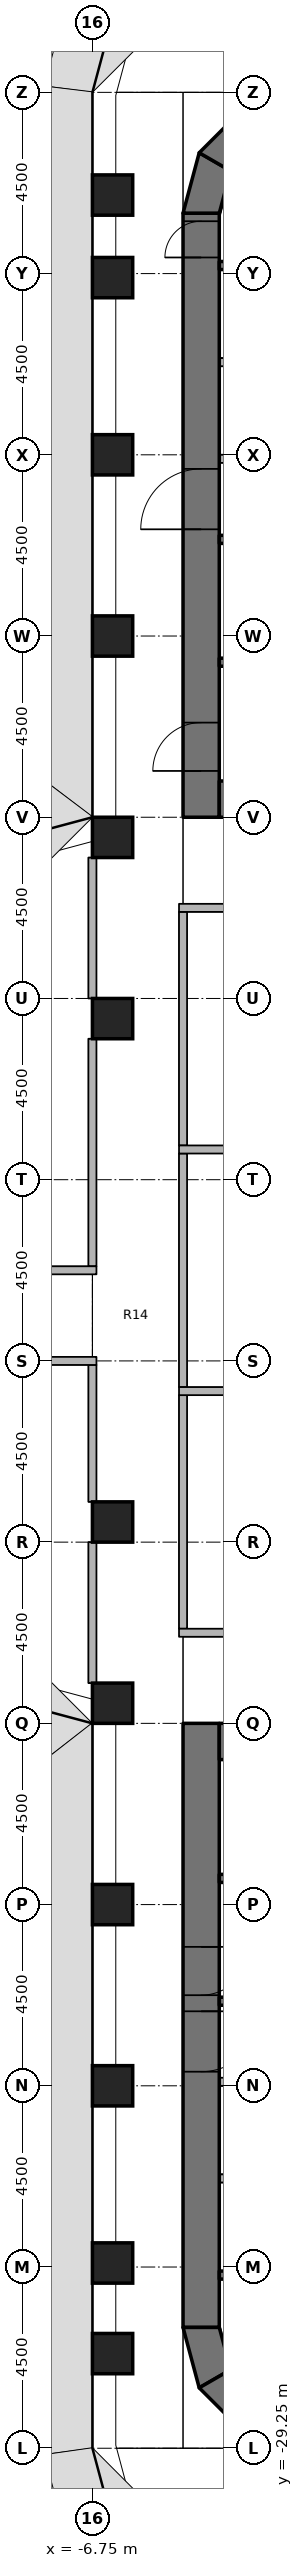
"""IFC4 building model, lengths in metres.
Left out: names, types, materials, properties, quantities, classifications, styles, units other than length and angle.
Written with IfcOpenShell. Run it as: python <this file> out.ifc"""

import sys

from ifc_helpers import new_model, si_unit, direction, frame, frame_2d, origin, origin_2d, place, context, subcontext, project, spatial, polyline, rectangle, outline, extrude, element, fill, save


model = new_model("IFC4")
c1 = context("Model", 3, precision=1e-05, world=origin(), true_north=direction((0.0, 1.0)))
c2 = subcontext(c1, "Body", "Model", "MODEL_VIEW")
j1 = project(units=[si_unit("LENGTHUNIT", "METRE"), si_unit("PLANEANGLEUNIT", "RADIAN")], contexts=[c1])
p1 = place(None, origin())
s1 = spatial("IfcSite", under=j1, at=p1, CompositionType="ELEMENT")
p2 = place(p1, origin())
s2 = spatial("IfcBuilding", under=s1, at=p2, CompositionType="ELEMENT")
p3 = place(p2, frame((0.0, 0.0, 31.2)))
s3 = spatial("IfcBuildingStorey", under=s2, at=p3, CompositionType="ELEMENT", Elevation=31.2)
for number, where, z_axis, x_axis in (
    (1, (-6.25, -26.9, 0.0), (0.0, 0.0, 1.0), (1.0, 0.0, 0.0)),
    (2, (-6.25, -24.65, 0.0), (0.0, 0.0, 1.0), (1.0, 0.0, 0.0)),
    (3, (-6.25, -20.25, 0.0), (0.0, 0.0, 1.0), (1.0, 0.0, 0.0)),
    (4, (-6.25, -15.75, 0.0), (0.0, 0.0, 1.0), (1.0, 0.0, 0.0)),
    (5, (-6.25, -10.75, 0.0), (0.0, 0.0, 1.0), (1.0, 0.0, 0.0)),
    (6, (-6.25, -6.25, 0.0), (0.0, 0.0, 1.0), (1.0, 0.0, 0.0)),
    (7, (-6.25, 6.25, 0.0), (0.0, 0.0, 1.0), (1.0, 0.0, 0.0)),
    (8, (-6.25, 10.75, 0.0), (0.0, 0.0, 1.0), (1.0, 0.0, 0.0)),
    (9, (-6.25, 15.75, 0.0), (0.0, 0.0, 1.0), (1.0, 0.0, 0.0)),
    (10, (-6.25, 20.25, 0.0), (0.0, 0.0, 1.0), (1.0, 0.0, 0.0)),
    (11, (-6.25, 24.65, 0.0), (0.0, 0.0, 1.0), (1.0, 0.0, 0.0)),
    (12, (-6.25, 26.7, 0.0), (0.0, 0.0, 1.0), (1.0, 0.0, 0.0)),
):
    element("IfcColumn", number, at=place(p3, frame(where, z_axis=z_axis, x_axis=x_axis)), inside=s3, PredefinedType="COLUMN", context=c2, shape_type="SweptSolid", body=[
        extrude(rectangle(XDim=1.0, YDim=1.0, at=origin_2d()), origin(), (0.0, 0.0, 1.0), 4.05),
    ])
p4 = place(p3, frame((-4.05, 11.25, 0.0), z_axis=(0.0, 0.0, 1.0), x_axis=(0.0, 1.0, 0.0)))
e13 = element("IfcWall", 13, at=p4, inside=s3, PredefinedType="SHEAR", context=c2, shape_type="SweptSolid", body=[
    extrude(rectangle(XDim=15.0, YDim=0.9, at=frame_2d((7.5, 0.0))), origin(), (0.0, 0.0, 1.0), 4.2),
])
p5 = place(p4, frame((7.15, 0.0, 0.0)))
e14 = element("IfcOpeningElement", 14, at=p5, cuts=e13, PredefinedType="OPENING", context=c2, shape_type="SweptSolid", body=[
    extrude(rectangle(XDim=1.5, YDim=2.3, at=frame_2d((0.75, 1.15))), frame((0.0, 0.46, 0.0), z_axis=(0.0, -1.0, 0.0), x_axis=(1.0, 0.0, 0.0)), (0.0, 0.0, 1.0), 0.92),
])
p6 = place(p4, frame((13.9, 0.0, 0.0)))
e15 = element("IfcOpeningElement", 15, at=p6, cuts=e13, PredefinedType="OPENING", context=c2, shape_type="SweptSolid", body=[
    extrude(rectangle(XDim=0.9, YDim=2.1, at=frame_2d((0.45, 1.05))), frame((0.0, 0.46, 0.0), z_axis=(0.0, -1.0, 0.0), x_axis=(1.0, 0.0, 0.0)), (0.0, 0.0, 1.0), 0.92),
])
p7 = place(p4, frame((1.15, 0.0, 0.0)))
e16 = element("IfcOpeningElement", 16, at=p7, cuts=e13, PredefinedType="OPENING", context=c2, shape_type="SweptSolid", body=[
    extrude(rectangle(XDim=1.2, YDim=2.1, at=frame_2d((0.6, 1.05))), frame((0.0, 0.46, 0.0), z_axis=(0.0, -1.0, 0.0), x_axis=(1.0, 0.0, 0.0)), (0.0, 0.0, 1.0), 0.92),
])
p8 = place(p3, frame((-3.6, 11.7, 0.0), z_axis=(0.0, 0.0, 1.0), x_axis=(1.0, 0.0, 0.0)))
e17 = element("IfcWall", 17, at=p8, inside=s3, PredefinedType="SHEAR", context=c2, shape_type="SweptSolid", body=[
    extrude(rectangle(XDim=7.2, YDim=0.9, at=frame_2d((3.6, 0.0))), origin(), (0.0, 0.0, 1.0), 4.2),
])
p9 = place(p3, origin())
e18 = element("IfcWall", 18, at=p9, inside=s3, PredefinedType="SHEAR", context=c2, shape_type="SweptSolid", body=[
    extrude(outline(polyline([(-4.5, 26.25), (-4.098, 27.75), (-3.319, 27.3), (-3.6, 26.25), (-4.5, 26.25)])), origin(), (0.0, 0.0, 1.0), 4.2),
])
p10 = place(p3, origin())
e19 = element("IfcWall", 19, at=p10, inside=s3, PredefinedType="SHEAR", context=c2, shape_type="SweptSolid", body=[
    extrude(outline(polyline([(-4.098, 27.75), (-3.0, 28.848), (-2.55, 28.069), (-3.319, 27.3), (-4.098, 27.75)])), origin(), (0.0, 0.0, 1.0), 4.2),
])
p11 = place(p3, frame((-4.05, -11.25, 0.0), z_axis=(0.0, 0.0, 1.0), x_axis=(0.0, -1.0, 0.0)))
e20 = element("IfcWall", 20, at=p11, inside=s3, PredefinedType="SHEAR", context=c2, shape_type="SweptSolid", body=[
    extrude(rectangle(XDim=15.0, YDim=0.9, at=frame_2d((7.5, 0.0))), origin(), (0.0, 0.0, 1.0), 4.2),
])
p12 = place(p11, frame((7.15, 0.0, 0.0)))
e21 = element("IfcOpeningElement", 21, at=p12, cuts=e20, PredefinedType="OPENING", context=c2, shape_type="SweptSolid", body=[
    extrude(rectangle(XDim=1.5, YDim=2.3, at=frame_2d((0.75, 1.15))), frame((0.0, 0.46, 0.0), z_axis=(0.0, -1.0, 0.0), x_axis=(1.0, 0.0, 0.0)), (0.0, 0.0, 1.0), 0.92),
])
p13 = place(p11, frame((5.55, 0.0, 0.0)))
e22 = element("IfcOpeningElement", 22, at=p13, cuts=e20, PredefinedType="OPENING", context=c2, shape_type="SweptSolid", body=[
    extrude(rectangle(XDim=1.2, YDim=2.1, at=frame_2d((0.6, 1.05))), frame((0.0, 0.46, 0.0), z_axis=(0.0, -1.0, 0.0), x_axis=(1.0, 0.0, 0.0)), (0.0, 0.0, 1.0), 0.92),
])
p14 = place(p3, frame((-3.6, -11.7, 0.0), z_axis=(0.0, 0.0, 1.0), x_axis=(1.0, 0.0, 0.0)))
e23 = element("IfcWall", 23, at=p14, inside=s3, PredefinedType="SHEAR", context=c2, shape_type="SweptSolid", body=[
    extrude(rectangle(XDim=7.2, YDim=0.9, at=frame_2d((3.6, 0.0))), origin(), (0.0, 0.0, 1.0), 4.2),
])
p15 = place(p3, origin())
e24 = element("IfcWall", 24, at=p15, inside=s3, PredefinedType="SHEAR", context=c2, shape_type="SweptSolid", body=[
    extrude(outline(polyline([(-4.5, -26.25), (-4.098, -27.75), (-3.319, -27.3), (-3.6, -26.25), (-4.5, -26.25)])), origin(), (0.0, 0.0, 1.0), 4.2),
])
p16 = place(p3, origin())
e25 = element("IfcWall", 25, at=p16, inside=s3, PredefinedType="SHEAR", context=c2, shape_type="SweptSolid", body=[
    extrude(outline(polyline([(-4.098, -27.75), (-3.0, -28.848), (-2.55, -28.069), (-3.319, -27.3), (-4.098, -27.75)])), origin(), (0.0, 0.0, 1.0), 4.2),
])
for number, where, z_axis, x_axis in (
    (26, (-3.6, 24.95, 0.0), (0.0, 0.0, 1.0), (1.0, 0.0, 0.0)),
    (27, (-3.6, 18.15, 0.0), (0.0, 0.0, 1.0), (1.0, 0.0, 0.0)),
    (28, (-3.6, 15.1, 0.0), (0.0, 0.0, 1.0), (1.0, 0.0, 0.0)),
):
    element("IfcWall", number, at=place(p3, frame(where, z_axis=z_axis, x_axis=x_axis)), inside=s3, PredefinedType="SHEAR", context=c2, shape_type="SweptSolid", body=[
        extrude(rectangle(XDim=7.2, YDim=0.2, at=frame_2d((3.6, 0.0))), origin(), (0.0, 0.0, 1.0), 4.05),
    ])
p17 = place(p3, frame((-3.6, 20.15, 0.0), z_axis=(0.0, 0.0, 1.0), x_axis=(1.0, 0.0, 0.0)))
e29 = element("IfcWall", 29, at=p17, inside=s3, PredefinedType="PARTITIONING", context=c2, shape_type="SweptSolid", body=[
    extrude(rectangle(XDim=2.7, YDim=0.2, at=frame_2d((1.35, 0.0))), origin(), (0.0, 0.0, 1.0), 4.05),
])
p18 = place(p3, frame((-3.6, 22.55, 0.0), z_axis=(0.0, 0.0, 1.0), x_axis=(1.0, 0.0, 0.0)))
e30 = element("IfcWall", 30, at=p18, inside=s3, PredefinedType="PARTITIONING", context=c2, shape_type="SweptSolid", body=[
    extrude(rectangle(XDim=2.5, YDim=0.2, at=frame_2d((1.25, 0.0))), origin(), (0.0, 0.0, 1.0), 4.05),
])
for number, where, z_axis, x_axis in (
    (31, (3.6, -24.95, 0.0), (0.0, 0.0, 1.0), (-1.0, 0.0, 0.0)),
    (32, (3.6, -18.15, 0.0), (0.0, 0.0, 1.0), (-1.0, 0.0, 0.0)),
    (33, (3.6, -15.1, 0.0), (0.0, 0.0, 1.0), (-1.0, 0.0, 0.0)),
):
    element("IfcWall", number, at=place(p3, frame(where, z_axis=z_axis, x_axis=x_axis)), inside=s3, PredefinedType="SHEAR", context=c2, shape_type="SweptSolid", body=[
        extrude(rectangle(XDim=7.2, YDim=0.2, at=frame_2d((3.6, 0.0))), origin(), (0.0, 0.0, 1.0), 4.05),
    ])
p19 = place(p3, frame((-0.9, -20.15, 0.0), z_axis=(0.0, 0.0, 1.0), x_axis=(-1.0, 0.0, 0.0)))
e34 = element("IfcWall", 34, at=p19, inside=s3, PredefinedType="PARTITIONING", context=c2, shape_type="SweptSolid", body=[
    extrude(rectangle(XDim=2.7, YDim=0.2, at=frame_2d((1.35, 0.0))), origin(), (0.0, 0.0, 1.0), 4.05),
])
p20 = place(p3, frame((-1.1, -22.55, 0.0), z_axis=(0.0, 0.0, 1.0), x_axis=(-1.0, 0.0, 0.0)))
e35 = element("IfcWall", 35, at=p20, inside=s3, PredefinedType="PARTITIONING", context=c2, shape_type="SweptSolid", body=[
    extrude(rectangle(XDim=2.5, YDim=0.2, at=frame_2d((1.25, 0.0))), origin(), (0.0, 0.0, 1.0), 4.05),
])
for number, where, z_axis, x_axis in (
    (36, (-4.5, 3.1, 0.0), (0.0, 0.0, 1.0), (0.0, 1.0, 0.0)),
    (37, (-4.5, -2.9, 0.0), (0.0, 0.0, 1.0), (0.0, 1.0, 0.0)),
    (38, (-4.5, -8.9, 0.0), (0.0, 0.0, 1.0), (0.0, 1.0, 0.0)),
):
    element("IfcWall", number, at=place(p3, frame(where, z_axis=z_axis, x_axis=x_axis)), inside=s3, PredefinedType="PARTITIONING", context=c2, shape_type="SweptSolid", body=[
        extrude(rectangle(XDim=5.8, YDim=0.2, at=frame_2d((2.9, 0.0))), origin(), (0.0, 0.0, 1.0), 3.131),
    ])
p21 = place(p3, frame((-6.75, 0.1, 0.0), z_axis=(0.0, 0.0, 1.0), x_axis=(0.0, 1.0, 0.0)))
e39 = element("IfcWall", 39, at=p21, inside=s3, PredefinedType="PARTITIONING", context=c2, shape_type="SweptSolid", body=[
    extrude(rectangle(XDim=5.65, YDim=0.2, at=frame_2d((2.825, 0.0))), origin(), (0.0, 0.0, 1.0), 3.131),
])
for number, where, z_axis, x_axis in (
    (40, (-6.75, 6.75, 0.0), (0.0, 0.0, 1.0), (0.0, 1.0, 0.0)),
    (41, (-6.75, -10.25, 0.0), (0.0, 0.0, 1.0), (0.0, 1.0, 0.0)),
):
    element("IfcWall", number, at=place(p3, frame(where, z_axis=z_axis, x_axis=x_axis)), inside=s3, PredefinedType="PARTITIONING", context=c2, shape_type="SweptSolid", body=[
        extrude(rectangle(XDim=3.5, YDim=0.2, at=frame_2d((1.75, 0.0))), origin(), (0.0, 0.0, 1.0), 3.131),
    ])
p22 = place(p3, frame((-6.75, -5.75, 0.0), z_axis=(0.0, 0.0, 1.0), x_axis=(0.0, 1.0, 0.0)))
e42 = element("IfcWall", 42, at=p22, inside=s3, PredefinedType="PARTITIONING", context=c2, shape_type="SweptSolid", body=[
    extrude(rectangle(XDim=3.4, YDim=0.2, at=frame_2d((1.7, 0.0))), origin(), (0.0, 0.0, 1.0), 3.131),
])
p23 = place(p3, frame((4.6, 9.0, 0.0), z_axis=(0.0, 0.0, 1.0), x_axis=(-1.0, 0.0, 0.0)))
e43 = element("IfcWall", 43, at=p23, inside=s3, PredefinedType="PARTITIONING", context=c2, shape_type="SweptSolid", body=[
    extrude(rectangle(XDim=9.2, YDim=0.2, at=frame_2d((4.6, 0.0))), origin(), (0.0, 0.0, 1.0), 3.131),
])
p24 = place(p23, frame((4.1, 0.0, 0.0)))
e44 = element("IfcOpeningElement", 44, at=p24, cuts=e43, PredefinedType="OPENING", context=c2, shape_type="SweptSolid", body=[
    extrude(rectangle(XDim=1.0, YDim=2.1, at=frame_2d((0.5, 1.05))), frame((0.0, 0.11, 0.0), z_axis=(0.0, -1.0, 0.0), x_axis=(1.0, 0.0, 0.0)), (0.0, 0.0, 1.0), 0.22),
])
p25 = place(p3, frame((-4.6, -9.0, 0.0), z_axis=(0.0, 0.0, 1.0), x_axis=(1.0, 0.0, 0.0)))
e45 = element("IfcWall", 45, at=p25, inside=s3, PredefinedType="PARTITIONING", context=c2, shape_type="SweptSolid", body=[
    extrude(rectangle(XDim=9.2, YDim=0.2, at=frame_2d((4.6, 0.0))), origin(), (0.0, 0.0, 1.0), 3.131),
])
p26 = place(p25, frame((4.1, 0.0, 0.0)))
e46 = element("IfcOpeningElement", 46, at=p26, cuts=e45, PredefinedType="OPENING", context=c2, shape_type="SweptSolid", body=[
    extrude(rectangle(XDim=1.0, YDim=2.1, at=frame_2d((0.5, 1.05))), frame((0.0, 0.11, 0.0), z_axis=(0.0, -1.0, 0.0), x_axis=(1.0, 0.0, 0.0)), (0.0, 0.0, 1.0), 0.22),
])
for number, where, z_axis, x_axis in (
    (47, (-4.6, 3.0, 0.0), (0.0, 0.0, 1.0), (1.0, 0.0, 0.0)),
    (48, (-4.6, -3.0, 0.0), (0.0, 0.0, 1.0), (1.0, 0.0, 0.0)),
):
    element("IfcWall", number, at=place(p3, frame(where, z_axis=z_axis, x_axis=x_axis)), inside=s3, PredefinedType="PARTITIONING", context=c2, shape_type="SweptSolid", body=[
        extrude(rectangle(XDim=9.2, YDim=0.2, at=frame_2d((4.6, 0.0))), origin(), (0.0, 0.0, 1.0), 3.131),
    ])
p27 = place(p3, frame((-11.35, 0.0, 0.0), z_axis=(0.0, 0.0, 1.0), x_axis=(1.0, 0.0, 0.0)))
e49 = element("IfcWall", 49, at=p27, inside=s3, PredefinedType="PARTITIONING", context=c2, shape_type="SweptSolid", body=[
    extrude(rectangle(XDim=4.7, YDim=0.2, at=frame_2d((2.35, 0.0))), origin(), (0.0, 0.0, 1.0), 3.131),
])
p28 = place(p27, frame((1.85, 0.0, 0.0)))
e50 = element("IfcOpeningElement", 50, at=p28, cuts=e49, PredefinedType="OPENING", context=c2, shape_type="SweptSolid", body=[
    extrude(rectangle(XDim=1.0, YDim=2.1, at=frame_2d((0.5, 1.05))), frame((0.0, 0.11, 0.0), z_axis=(0.0, -1.0, 0.0), x_axis=(1.0, 0.0, 0.0)), (0.0, 0.0, 1.0), 0.22),
])
p29 = place(p3, frame((-6.65, -2.25, 0.0), z_axis=(0.0, 0.0, 1.0), x_axis=(-1.0, 0.0, 0.0)))
e51 = element("IfcWall", 51, at=p29, inside=s3, PredefinedType="PARTITIONING", context=c2, shape_type="SweptSolid", body=[
    extrude(rectangle(XDim=4.7, YDim=0.2, at=frame_2d((2.35, 0.0))), origin(), (0.0, 0.0, 1.0), 3.131),
])
p30 = place(p29, frame((1.85, 0.0, 0.0)))
e52 = element("IfcOpeningElement", 52, at=p30, cuts=e51, PredefinedType="OPENING", context=c2, shape_type="SweptSolid", body=[
    extrude(rectangle(XDim=1.0, YDim=2.1, at=frame_2d((0.5, 1.05))), frame((0.0, 0.11, 0.0), z_axis=(0.0, -1.0, 0.0), x_axis=(1.0, 0.0, 0.0)), (0.0, 0.0, 1.0), 0.22),
])
p31 = place(p5, origin())
e53 = element("IfcDoor", 53, at=p31, inside=s3, OperationType="DOUBLE_DOOR_SINGLE_SWING", PredefinedType="DOOR", context=c2, shape_type="SweptSolid", body=[
    extrude(rectangle(XDim=1.5, YDim=2.3, at=frame_2d((0.75, 1.15))), frame((0.0, 0.025, 0.0), z_axis=(0.0, -1.0, 0.0), x_axis=(1.0, 0.0, 0.0)), (0.0, 0.0, 1.0), 0.05),
])
fill(e14, e53)
p32 = place(p6, origin())
e54 = element("IfcDoor", 54, at=p32, inside=s3, OperationType="SINGLE_SWING_LEFT", PredefinedType="DOOR", context=c2, shape_type="SweptSolid", body=[
    extrude(rectangle(XDim=0.9, YDim=2.1, at=frame_2d((0.45, 1.05))), frame((0.0, 0.025, 0.0), z_axis=(0.0, -1.0, 0.0), x_axis=(1.0, 0.0, 0.0)), (0.0, 0.0, 1.0), 0.05),
])
fill(e15, e54)
p33 = place(p7, origin())
e55 = element("IfcDoor", 55, at=p33, inside=s3, OperationType="SINGLE_SWING_RIGHT", PredefinedType="DOOR", context=c2, shape_type="SweptSolid", body=[
    extrude(rectangle(XDim=1.2, YDim=2.1, at=frame_2d((0.6, 1.05))), frame((0.0, 0.025, 0.0), z_axis=(0.0, -1.0, 0.0), x_axis=(1.0, 0.0, 0.0)), (0.0, 0.0, 1.0), 0.05),
])
fill(e16, e55)
p34 = place(p12, origin())
e56 = element("IfcDoor", 56, at=p34, inside=s3, OperationType="DOUBLE_DOOR_SINGLE_SWING", PredefinedType="DOOR", context=c2, shape_type="SweptSolid", body=[
    extrude(rectangle(XDim=1.5, YDim=2.3, at=frame_2d((0.75, 1.15))), frame((0.0, 0.025, 0.0), z_axis=(0.0, -1.0, 0.0), x_axis=(1.0, 0.0, 0.0)), (0.0, 0.0, 1.0), 0.05),
])
fill(e21, e56)
p35 = place(p13, origin())
e57 = element("IfcDoor", 57, at=p35, inside=s3, OperationType="SINGLE_SWING_LEFT", PredefinedType="DOOR", context=c2, shape_type="SweptSolid", body=[
    extrude(rectangle(XDim=1.2, YDim=2.1, at=frame_2d((0.6, 1.05))), frame((0.0, 0.025, 0.0), z_axis=(0.0, -1.0, 0.0), x_axis=(1.0, 0.0, 0.0)), (0.0, 0.0, 1.0), 0.05),
])
fill(e22, e57)
save(model, sys.argv[1])
